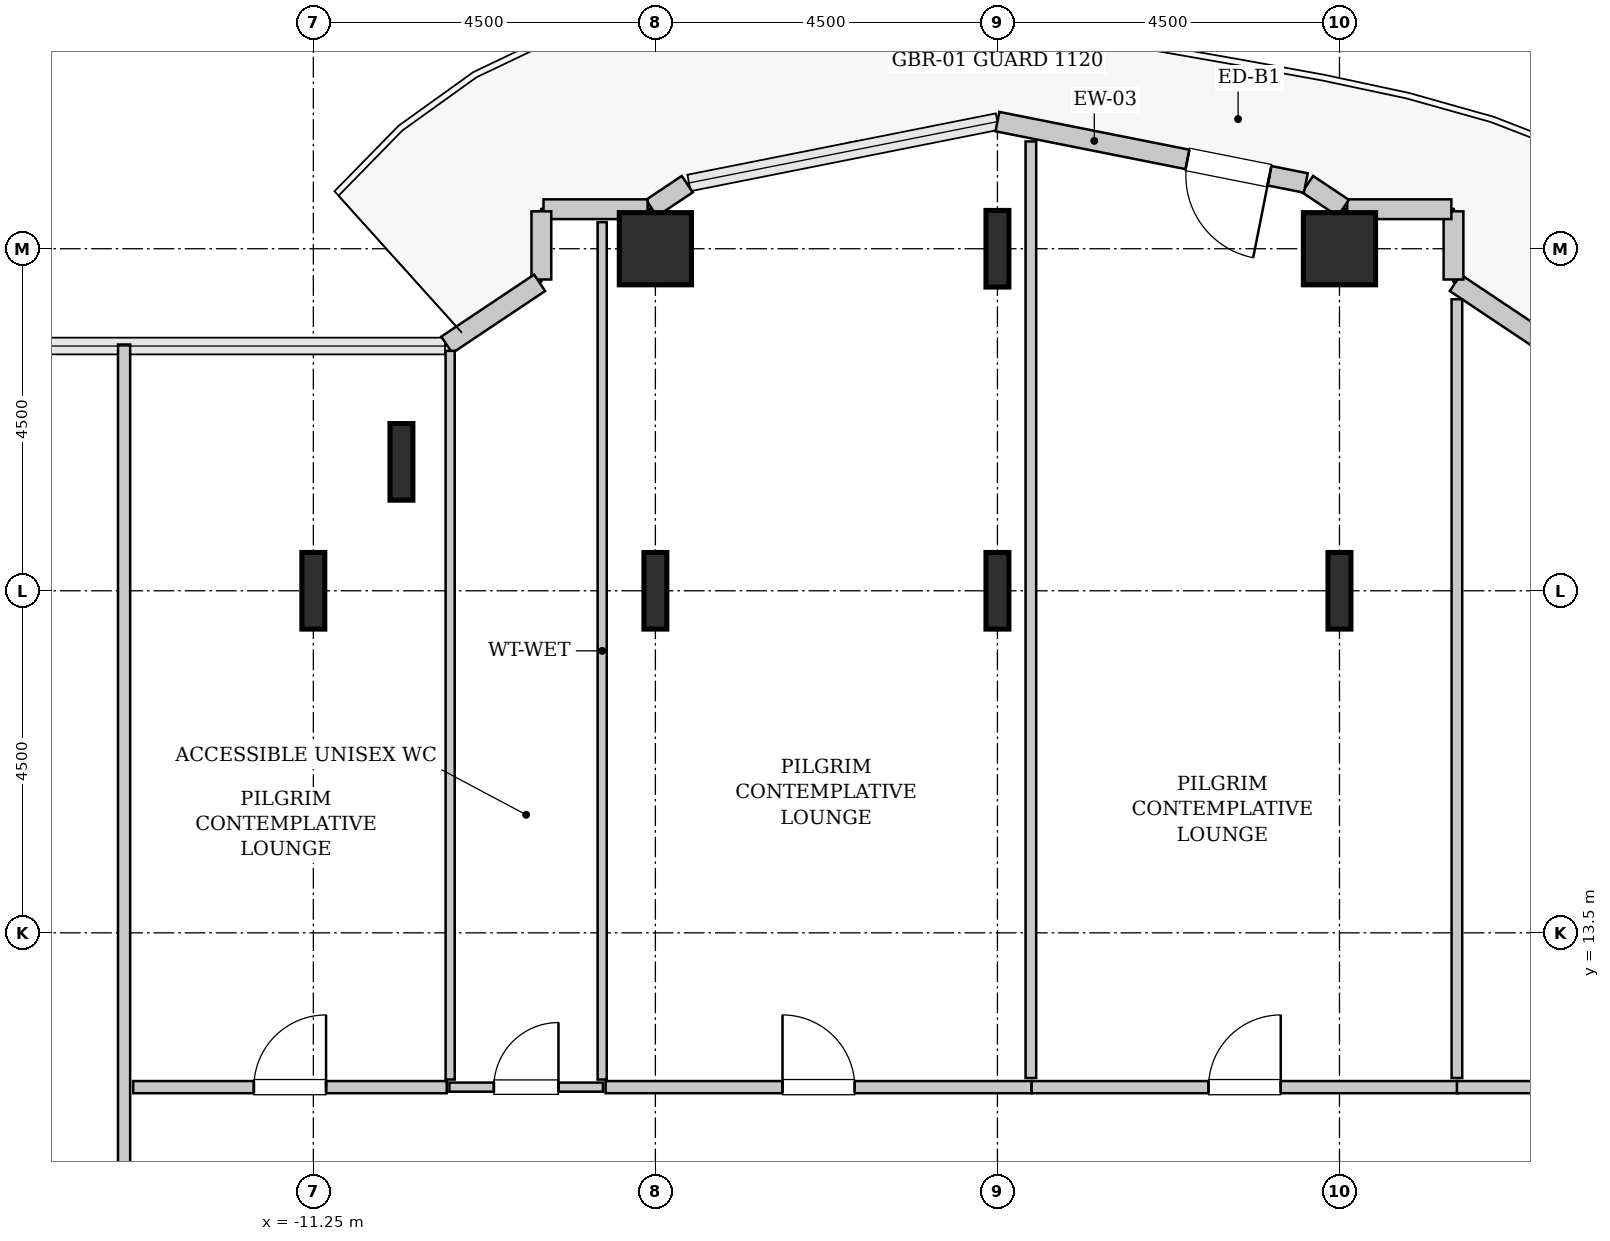
"""IFC4 building model, lengths in metres.
Left out: names, types, materials, properties, quantities, classifications, styles, units other than length and angle.
Written with IfcOpenShell. Run it as: python <this file> out.ifc"""

import sys

from ifc_helpers import new_model, si_unit, direction, frame, frame_2d, origin, origin_2d, place, context, subcontext, project, spatial, rectangle, hollow_rectangle, i_section, extrude, source, transform, mapped, element, fill, save


model = new_model("IFC4")
c1 = context("Model", 3, precision=1e-05, world=origin(), true_north=direction((0.0, 1.0)))
c2 = subcontext(c1, "Body", "Model", "MODEL_VIEW")
j1 = project(units=[si_unit("LENGTHUNIT", "METRE"), si_unit("PLANEANGLEUNIT", "RADIAN")], contexts=[c1])
p1 = place(None, origin())
s1 = spatial("IfcSite", under=j1, at=p1, CompositionType="ELEMENT")
p2 = place(p1, origin())
s2 = spatial("IfcBuilding", under=s1, at=p2, CompositionType="ELEMENT")
p3 = place(p2, frame((0.0, 0.0, 78.6)))
s3 = spatial("IfcBuildingStorey", under=s2, at=p3, CompositionType="ELEMENT", Elevation=78.6)
m1 = source(origin(), c2, "Body", "SweptSolid", [
    extrude(i_section(OverallWidth=0.302, OverallDepth=1.008, WebThickness=0.021, FlangeThickness=0.04, FilletRadius=0.03, at=origin_2d()), origin(), (0.0, 0.0, 1.0), 3.8),
])
for number, where, z_axis, x_axis in (
    (1, (-11.25, 18.0, 0.0), (0.0, 0.0, 1.0), (1.0, 0.0, 0.0)),
    (2, (-10.091, 19.696, 0.0), (0.0, 0.0, 1.0), (1.0, 0.0, 0.0)),
    (3, (-6.75, 18.0, 0.0), (0.0, 0.0, 1.0), (1.0, 0.0, 0.0)),
):
    element("IfcColumn", number, at=place(p3, frame(where, z_axis=z_axis, x_axis=x_axis)), inside=s3, PredefinedType="COLUMN", context=c2, shape_type="MappedRepresentation", body=[
        mapped(m1, transform((0.0, 0.0, 0.0), x_axis=(1.0, 0.0, 0.0), y_axis=(0.0, 1.0, 0.0), z_axis=(0.0, 0.0, 1.0), scale=1.0)),
    ])
m2 = source(origin(), c2, "Body", "SweptSolid", [
    extrude(hollow_rectangle(XDim=0.95, YDim=0.95, WallThickness=0.045, InnerFilletRadius=0.045, OuterFilletRadius=0.09, at=origin_2d()), origin(), (0.0, 0.0, 1.0), 3.8),
])
p4 = place(p3, frame((-6.75, 22.5, 0.0), z_axis=(0.0, 0.0, 1.0), x_axis=(1.0, 0.0, 0.0)))
e4 = element("IfcColumn", 4, at=p4, inside=s3, PredefinedType="COLUMN", context=c2, shape_type="MappedRepresentation", body=[
    mapped(m2, transform((0.0, 0.0, 0.0), x_axis=(1.0, 0.0, 0.0), y_axis=(0.0, 1.0, 0.0), z_axis=(0.0, 0.0, 1.0), scale=1.0)),
])
for number, where, z_axis, x_axis in (
    (5, (-2.25, 18.0, 0.0), (0.0, 0.0, 1.0), (1.0, 0.0, 0.0)),
    (6, (-2.25, 22.5, 0.0), (0.0, 0.0, 1.0), (1.0, 0.0, 0.0)),
    (7, (2.25, 18.0, 0.0), (0.0, 0.0, 1.0), (1.0, 0.0, 0.0)),
):
    element("IfcColumn", number, at=place(p3, frame(where, z_axis=z_axis, x_axis=x_axis)), inside=s3, PredefinedType="COLUMN", context=c2, shape_type="MappedRepresentation", body=[
        mapped(m1, transform((0.0, 0.0, 0.0), x_axis=(1.0, 0.0, 0.0), y_axis=(0.0, 1.0, 0.0), z_axis=(0.0, 0.0, 1.0), scale=1.0)),
    ])
p5 = place(p3, frame((2.25, 22.5, 0.0), z_axis=(0.0, 0.0, 1.0), x_axis=(1.0, 0.0, 0.0)))
e8 = element("IfcColumn", 8, at=p5, inside=s3, PredefinedType="COLUMN", context=c2, shape_type="MappedRepresentation", body=[
    mapped(m2, transform((0.0, 0.0, 0.0), x_axis=(1.0, 0.0, 0.0), y_axis=(0.0, 1.0, 0.0), z_axis=(0.0, 0.0, 1.0), scale=1.0)),
])
m3 = source(origin(), c2, "Body", "SweptSolid", [
    extrude(rectangle(XDim=1.469, YDim=0.26, at=frame_2d((0.734, 0.0))), origin(), (0.0, 0.0, 1.0), 3.55),
])
p6 = place(p3, frame((4.995, 21.236, 0.0), z_axis=(0.0, 0.0, 1.0), x_axis=(-0.831461760506, 0.555581983884, 0.0)))
e9 = element("IfcWall", 9, at=p6, inside=s3, PredefinedType="SOLIDWALL", context=c2, shape_type="MappedRepresentation", body=[
    mapped(m3, transform((0.0, 0.0, 0.0), x_axis=(1.0, 0.0, 0.0), y_axis=(0.0, 1.0, 0.0), z_axis=(0.0, 0.0, 1.0), scale=1.0)),
])
m4 = source(origin(), c2, "Body", "SweptSolid", [
    extrude(rectangle(XDim=0.897, YDim=0.26, at=frame_2d((0.448, 0.0))), origin(), (0.0, 0.0, 1.0), 3.55),
])
p7 = place(p3, frame((3.75, 22.095, 0.0), z_axis=(0.0, 0.0, 1.0), x_axis=(0.0, 1.0, 0.0)))
e10 = element("IfcWall", 10, at=p7, inside=s3, PredefinedType="SOLIDWALL", context=c2, shape_type="MappedRepresentation", body=[
    mapped(m4, transform((0.0, 0.0, 0.0), x_axis=(1.0, 0.0, 0.0), y_axis=(0.0, 1.0, 0.0), z_axis=(0.0, 0.0, 1.0), scale=1.0)),
])
m5 = source(origin(), c2, "Body", "SweptSolid", [
    extrude(rectangle(XDim=1.37, YDim=0.26, at=frame_2d((0.685, 0.0))), origin(), (0.0, 0.0, 1.0), 3.55),
])
p8 = place(p3, frame((3.722, 23.02, 0.0), z_axis=(0.0, 0.0, 1.0), x_axis=(-1.0, 0.0, 0.0)))
e11 = element("IfcWall", 11, at=p8, inside=s3, PredefinedType="SOLIDWALL", context=c2, shape_type="MappedRepresentation", body=[
    mapped(m5, transform((0.0, 0.0, 0.0), x_axis=(1.0, 0.0, 0.0), y_axis=(0.0, 1.0, 0.0), z_axis=(0.0, 0.0, 1.0), scale=1.0)),
])
m6 = source(origin(), c2, "Body", "SweptSolid", [
    extrude(rectangle(XDim=0.565, YDim=0.26, at=frame_2d((0.283, 0.0))), origin(), (0.0, 0.0, 1.0), 3.55),
])
p9 = place(p3, frame((2.301, 23.036, 0.0), z_axis=(0.0, 0.0, 1.0), x_axis=(-0.831651492666, 0.555297933317, 0.0)))
e12 = element("IfcWall", 12, at=p9, inside=s3, PredefinedType="SOLIDWALL", context=c2, shape_type="MappedRepresentation", body=[
    mapped(m6, transform((0.0, 0.0, 0.0), x_axis=(1.0, 0.0, 0.0), y_axis=(0.0, 1.0, 0.0), z_axis=(0.0, 0.0, 1.0), scale=1.0)),
])
m7 = source(origin(), c2, "Body", "SweptSolid", [
    extrude(rectangle(XDim=4.137, YDim=0.26, at=frame_2d((2.068, 0.0))), origin(), (0.0, 0.0, 1.0), 3.55),
])
p10 = place(p3, frame((1.807, 23.365, 0.0), z_axis=(0.0, 0.0, 1.0), x_axis=(-0.980782170794, 0.195105954428, 0.0)))
e13 = element("IfcWall", 13, at=p10, inside=s3, PredefinedType="SOLIDWALL", context=c2, shape_type="MappedRepresentation", body=[
    mapped(m7, transform((0.0, 0.0, 0.0), x_axis=(1.0, 0.0, 0.0), y_axis=(0.0, 1.0, 0.0), z_axis=(0.0, 0.0, 1.0), scale=1.0)),
])
p11 = place(p10, frame((0.488, 0.0, 0.0)))
e14 = element("IfcOpeningElement", 14, at=p11, cuts=e13, PredefinedType="OPENING", context=c2, shape_type="SweptSolid", body=[
    extrude(rectangle(XDim=1.1, YDim=2.2, at=frame_2d((0.55, 1.1))), frame((0.0, 0.14, 0.0), z_axis=(0.0, -1.0, 0.0), x_axis=(1.0, 0.0, 0.0)), (0.0, 0.0, 1.0), 0.28),
])
p12 = place(p3, frame((-6.331, 23.35, 0.0), z_axis=(0.0, 0.0, 1.0), x_axis=(-0.831651492666, -0.555297933317, 0.0)))
e15 = element("IfcWall", 15, at=p12, inside=s3, PredefinedType="SOLIDWALL", context=c2, shape_type="MappedRepresentation", body=[
    mapped(m6, transform((0.0, 0.0, 0.0), x_axis=(1.0, 0.0, 0.0), y_axis=(0.0, 1.0, 0.0), z_axis=(0.0, 0.0, 1.0), scale=1.0)),
])
p13 = place(p3, frame((-6.852, 23.02, 0.0), z_axis=(0.0, 0.0, 1.0), x_axis=(-1.0, 0.0, 0.0)))
e16 = element("IfcWall", 16, at=p13, inside=s3, PredefinedType="SOLIDWALL", context=c2, shape_type="MappedRepresentation", body=[
    mapped(m5, transform((0.0, 0.0, 0.0), x_axis=(1.0, 0.0, 0.0), y_axis=(0.0, 1.0, 0.0), z_axis=(0.0, 0.0, 1.0), scale=1.0)),
])
p14 = place(p3, frame((-8.25, 22.992, 0.0), z_axis=(0.0, 0.0, 1.0), x_axis=(0.0, -1.0, 0.0)))
e17 = element("IfcWall", 17, at=p14, inside=s3, PredefinedType="SOLIDWALL", context=c2, shape_type="MappedRepresentation", body=[
    mapped(m4, transform((0.0, 0.0, 0.0), x_axis=(1.0, 0.0, 0.0), y_axis=(0.0, 1.0, 0.0), z_axis=(0.0, 0.0, 1.0), scale=1.0)),
])
p15 = place(p3, frame((-8.273, 22.052, 0.0), z_axis=(0.0, 0.0, 1.0), x_axis=(-0.831461760506, -0.555581983884, 0.0)))
e18 = element("IfcWall", 18, at=p15, inside=s3, PredefinedType="SOLIDWALL", context=c2, shape_type="MappedRepresentation", body=[
    mapped(m3, transform((0.0, 0.0, 0.0), x_axis=(1.0, 0.0, 0.0), y_axis=(0.0, 1.0, 0.0), z_axis=(0.0, 0.0, 1.0), scale=1.0)),
])
m8 = source(origin(), c2, "Body", "SweptSolid", [
    extrude(rectangle(XDim=2.02, YDim=0.12, at=frame_2d((1.01, 0.0))), origin(), (0.0, 0.0, 1.0), 3.535),
])
p16 = place(p3, frame((-9.46, 11.47, 0.0), z_axis=(0.0, 0.0, 1.0), x_axis=(1.0, 0.0, 0.0)))
e19 = element("IfcWall", 19, at=p16, inside=s3, PredefinedType="PLUMBINGWALL", context=c2, shape_type="MappedRepresentation", body=[
    mapped(m8, transform((0.0, 0.0, 0.0), x_axis=(1.0, 0.0, 0.0), y_axis=(0.0, 1.0, 0.0), z_axis=(0.0, 0.0, 1.0), scale=1.0)),
])
p17 = place(p16, frame((0.585, 0.0, 0.0)))
e20 = element("IfcOpeningElement", 20, at=p17, cuts=e19, PredefinedType="OPENING", context=c2, shape_type="SweptSolid", body=[
    extrude(rectangle(XDim=0.85, YDim=2.1, at=frame_2d((0.425, 1.05))), frame((0.0, 0.07, 0.0), z_axis=(0.0, -1.0, 0.0), x_axis=(1.0, 0.0, 0.0)), (0.0, 0.0, 1.0), 0.14),
])
m9 = source(origin(), c2, "Body", "SweptSolid", [
    extrude(rectangle(XDim=11.28, YDim=0.12, at=frame_2d((5.64, 0.0))), origin(), (0.0, 0.0, 1.0), 3.535),
])
p18 = place(p3, frame((-7.45, 11.57, 0.0), z_axis=(0.0, 0.0, 1.0), x_axis=(0.0, 1.0, 0.0)))
e21 = element("IfcWall", 21, at=p18, inside=s3, PredefinedType="PLUMBINGWALL", context=c2, shape_type="MappedRepresentation", body=[
    mapped(m9, transform((0.0, 0.0, 0.0), x_axis=(1.0, 0.0, 0.0), y_axis=(0.0, 1.0, 0.0), z_axis=(0.0, 0.0, 1.0), scale=1.0)),
])
m10 = source(origin(), c2, "Body", "SweptSolid", [
    extrude(rectangle(XDim=9.587, YDim=0.12, at=frame_2d((4.793, 0.0))), origin(), (0.0, 0.0, 1.0), 3.535),
])
p19 = place(p3, frame((-9.45, 11.57, 0.0), z_axis=(0.0, 0.0, 1.0), x_axis=(0.0, 1.0, 0.0)))
e22 = element("IfcWall", 22, at=p19, inside=s3, PredefinedType="PLUMBINGWALL", context=c2, shape_type="MappedRepresentation", body=[
    mapped(m10, transform((0.0, 0.0, 0.0), x_axis=(1.0, 0.0, 0.0), y_axis=(0.0, 1.0, 0.0), z_axis=(0.0, 0.0, 1.0), scale=1.0)),
])
m11 = source(origin(), c2, "Body", "SweptSolid", [
    extrude(rectangle(XDim=13.153, YDim=0.16, at=frame_2d((6.576, 0.0))), origin(), (0.0, 0.0, 1.0), 3.535),
])
p20 = place(p3, frame((-13.74, 8.087, 0.0), z_axis=(0.0, 0.0, 1.0), x_axis=(0.0, 1.0, 0.0)))
e23 = element("IfcWall", 23, at=p20, inside=s3, PredefinedType="PARTITIONING", context=c2, shape_type="MappedRepresentation", body=[
    mapped(m11, transform((0.0, 0.0, 0.0), x_axis=(1.0, 0.0, 0.0), y_axis=(0.0, 1.0, 0.0), z_axis=(0.0, 0.0, 1.0), scale=1.0)),
])
p21 = place(p20, frame((1.236, 0.0, 0.0)))
e24 = element("IfcOpeningElement", 24, at=p21, cuts=e23, PredefinedType="OPENING", context=c2, shape_type="SweptSolid", body=[
    extrude(rectangle(XDim=0.95, YDim=2.1, at=frame_2d((0.475, 1.05))), frame((0.0, 0.09, 0.0), z_axis=(0.0, -1.0, 0.0), x_axis=(1.0, 0.0, 0.0)), (0.0, 0.0, 1.0), 0.18),
])
m12 = source(origin(), c2, "Body", "SweptSolid", [
    extrude(rectangle(XDim=4.125, YDim=0.16, at=frame_2d((2.062, 0.0))), origin(), (0.0, 0.0, 1.0), 3.535),
])
p22 = place(p3, frame((-13.62, 11.47, 0.0), z_axis=(0.0, 0.0, 1.0), x_axis=(1.0, 0.0, 0.0)))
e25 = element("IfcWall", 25, at=p22, inside=s3, PredefinedType="PARTITIONING", context=c2, shape_type="MappedRepresentation", body=[
    mapped(m12, transform((0.0, 0.0, 0.0), x_axis=(1.0, 0.0, 0.0), y_axis=(0.0, 1.0, 0.0), z_axis=(0.0, 0.0, 1.0), scale=1.0)),
])
p23 = place(p22, frame((1.587, 0.0, 0.0)))
e26 = element("IfcOpeningElement", 26, at=p23, cuts=e25, PredefinedType="OPENING", context=c2, shape_type="SweptSolid", body=[
    extrude(rectangle(XDim=0.95, YDim=2.1, at=frame_2d((0.475, 1.05))), frame((0.0, 0.09, 0.0), z_axis=(0.0, -1.0, 0.0), x_axis=(1.0, 0.0, 0.0)), (0.0, 0.0, 1.0), 0.18),
])
m13 = source(origin(), c2, "Body", "SweptSolid", [
    extrude(rectangle(XDim=5.605, YDim=0.16, at=frame_2d((2.802, 0.0))), origin(), (0.0, 0.0, 1.0), 3.535),
])
p24 = place(p3, frame((-7.405, 11.47, 0.0), z_axis=(0.0, 0.0, 1.0), x_axis=(1.0, 0.0, 0.0)))
e27 = element("IfcWall", 27, at=p24, inside=s3, PredefinedType="PARTITIONING", context=c2, shape_type="MappedRepresentation", body=[
    mapped(m13, transform((0.0, 0.0, 0.0), x_axis=(1.0, 0.0, 0.0), y_axis=(0.0, 1.0, 0.0), z_axis=(0.0, 0.0, 1.0), scale=1.0)),
])
p25 = place(p24, frame((2.327, 0.0, 0.0)))
e28 = element("IfcOpeningElement", 28, at=p25, cuts=e27, PredefinedType="OPENING", context=c2, shape_type="SweptSolid", body=[
    extrude(rectangle(XDim=0.95, YDim=2.1, at=frame_2d((0.475, 1.05))), frame((0.0, 0.09, 0.0), z_axis=(0.0, -1.0, 0.0), x_axis=(1.0, 0.0, 0.0)), (0.0, 0.0, 1.0), 0.18),
])
m14 = source(origin(), c2, "Body", "SweptSolid", [
    extrude(rectangle(XDim=12.322, YDim=0.14, at=frame_2d((6.161, 0.0))), origin(), (0.0, 0.0, 1.0), 2.825),
])
p26 = place(p3, frame((-1.81, 11.59, 0.0), z_axis=(0.0, 0.0, 1.0), x_axis=(0.0, 1.0, 0.0)))
e29 = element("IfcWall", 29, at=p26, inside=s3, PredefinedType="PARTITIONING", context=c2, shape_type="MappedRepresentation", body=[
    mapped(m14, transform((0.0, 0.0, 0.0), x_axis=(1.0, 0.0, 0.0), y_axis=(0.0, 1.0, 0.0), z_axis=(0.0, 0.0, 1.0), scale=1.0)),
])
p27 = place(p3, frame((-1.8, 11.47, 0.0), z_axis=(0.0, 0.0, 1.0), x_axis=(1.0, 0.0, 0.0)))
e30 = element("IfcWall", 30, at=p27, inside=s3, PredefinedType="PARTITIONING", context=c2, shape_type="MappedRepresentation", body=[
    mapped(m13, transform((0.0, 0.0, 0.0), x_axis=(1.0, 0.0, 0.0), y_axis=(0.0, 1.0, 0.0), z_axis=(0.0, 0.0, 1.0), scale=1.0)),
])
p28 = place(p27, frame((2.327, 0.0, 0.0)))
e31 = element("IfcOpeningElement", 31, at=p28, cuts=e30, PredefinedType="OPENING", context=c2, shape_type="SweptSolid", body=[
    extrude(rectangle(XDim=0.95, YDim=2.1, at=frame_2d((0.475, 1.05))), frame((0.0, 0.09, 0.0), z_axis=(0.0, -1.0, 0.0), x_axis=(1.0, 0.0, 0.0)), (0.0, 0.0, 1.0), 0.18),
])
m15 = source(origin(), c2, "Body", "SweptSolid", [
    extrude(rectangle(XDim=10.245, YDim=0.14, at=frame_2d((5.123, 0.0))), origin(), (0.0, 0.0, 1.0), 3.535),
])
p29 = place(p3, frame((3.795, 11.59, 0.0), z_axis=(0.0, 0.0, 1.0), x_axis=(0.0, 1.0, 0.0)))
e32 = element("IfcWall", 32, at=p29, inside=s3, PredefinedType="PARTITIONING", context=c2, shape_type="MappedRepresentation", body=[
    mapped(m15, transform((0.0, 0.0, 0.0), x_axis=(1.0, 0.0, 0.0), y_axis=(0.0, 1.0, 0.0), z_axis=(0.0, 0.0, 1.0), scale=1.0)),
])
m16 = source(origin(), c2, "Body", "SweptSolid", [
    extrude(rectangle(XDim=4.965, YDim=0.16, at=frame_2d((2.482, 0.0))), origin(), (0.0, 0.0, 1.0), 3.535),
])
p30 = place(p3, frame((3.795, 11.47, 0.0), z_axis=(0.0, 0.0, 1.0), x_axis=(1.0, 0.0, 0.0)))
e33 = element("IfcWall", 33, at=p30, inside=s3, PredefinedType="PARTITIONING", context=c2, shape_type="MappedRepresentation", body=[
    mapped(m16, transform((0.0, 0.0, 0.0), x_axis=(1.0, 0.0, 0.0), y_axis=(0.0, 1.0, 0.0), z_axis=(0.0, 0.0, 1.0), scale=1.0)),
])
p31 = place(p30, frame((2.008, 0.0, 0.0)))
e34 = element("IfcOpeningElement", 34, at=p31, cuts=e33, PredefinedType="OPENING", context=c2, shape_type="SweptSolid", body=[
    extrude(rectangle(XDim=0.95, YDim=2.1, at=frame_2d((0.475, 1.05))), frame((0.0, 0.09, 0.0), z_axis=(0.0, -1.0, 0.0), x_axis=(1.0, 0.0, 0.0)), (0.0, 0.0, 1.0), 0.18),
])
m17 = source(origin(), c2, "Body", "SweptSolid", [
    extrude(rectangle(XDim=1.1, YDim=2.2, at=frame_2d((0.55, 1.1))), frame((0.0, 0.025, 0.0), z_axis=(0.0, -1.0, 0.0), x_axis=(1.0, 0.0, 0.0)), (0.0, 0.0, 1.0), 0.05),
])
p32 = place(p11, origin())
e35 = element("IfcDoor", 35, at=p32, inside=s3, OperationType="SINGLE_SWING_LEFT", PredefinedType="DOOR", context=c2, shape_type="MappedRepresentation", body=[
    mapped(m17, transform((0.0, 0.0, 0.0), x_axis=(1.0, 0.0, 0.0), y_axis=(0.0, 1.0, 0.0), z_axis=(0.0, 0.0, 1.0), scale=1.0)),
])
fill(e14, e35)
m18 = source(origin(), c2, "Body", "SweptSolid", [
    extrude(rectangle(XDim=0.85, YDim=2.1, at=frame_2d((0.425, 1.05))), frame((0.0, 0.025, 0.0), z_axis=(0.0, -1.0, 0.0), x_axis=(1.0, 0.0, 0.0)), (0.0, 0.0, 1.0), 0.05),
])
p33 = place(p17, origin())
e36 = element("IfcDoor", 36, at=p33, inside=s3, OperationType="SINGLE_SWING_RIGHT", PredefinedType="DOOR", context=c2, shape_type="MappedRepresentation", body=[
    mapped(m18, transform((0.0, 0.0, 0.0), x_axis=(1.0, 0.0, 0.0), y_axis=(0.0, 1.0, 0.0), z_axis=(0.0, 0.0, 1.0), scale=1.0)),
])
fill(e20, e36)
m19 = source(origin(), c2, "Body", "SweptSolid", [
    extrude(rectangle(XDim=0.95, YDim=2.1, at=frame_2d((0.475, 1.05))), frame((0.0, 0.025, 0.0), z_axis=(0.0, -1.0, 0.0), x_axis=(1.0, 0.0, 0.0)), (0.0, 0.0, 1.0), 0.05),
])
p34 = place(p23, origin())
e37 = element("IfcDoor", 37, at=p34, inside=s3, OperationType="SINGLE_SWING_RIGHT", PredefinedType="DOOR", context=c2, shape_type="MappedRepresentation", body=[
    mapped(m19, transform((0.0, 0.0, 0.0), x_axis=(1.0, 0.0, 0.0), y_axis=(0.0, 1.0, 0.0), z_axis=(0.0, 0.0, 1.0), scale=1.0)),
])
fill(e26, e37)
p35 = place(p25, origin())
e38 = element("IfcDoor", 38, at=p35, inside=s3, OperationType="SINGLE_SWING_LEFT", PredefinedType="DOOR", context=c2, shape_type="MappedRepresentation", body=[
    mapped(m19, transform((0.0, 0.0, 0.0), x_axis=(1.0, 0.0, 0.0), y_axis=(0.0, 1.0, 0.0), z_axis=(0.0, 0.0, 1.0), scale=1.0)),
])
fill(e28, e38)
p36 = place(p28, origin())
e39 = element("IfcDoor", 39, at=p36, inside=s3, OperationType="SINGLE_SWING_RIGHT", PredefinedType="DOOR", context=c2, shape_type="MappedRepresentation", body=[
    mapped(m19, transform((0.0, 0.0, 0.0), x_axis=(1.0, 0.0, 0.0), y_axis=(0.0, 1.0, 0.0), z_axis=(0.0, 0.0, 1.0), scale=1.0)),
])
fill(e31, e39)
save(model, sys.argv[1])
